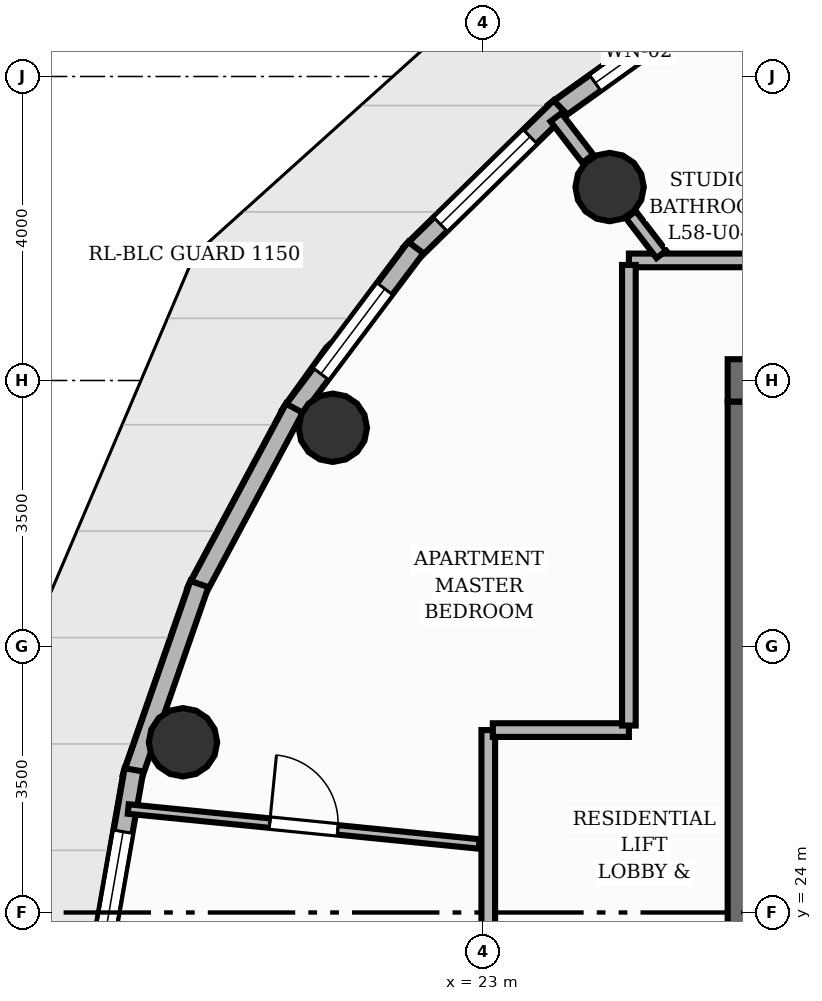
"""IFC4 building model, lengths in metres.
Left out: names, types, materials, properties, quantities, classifications, styles, units other than length and angle.
Written with IfcOpenShell. Run it as: python <this file> out.ifc"""

import sys

from ifc_helpers import new_model, si_unit, direction, frame, frame_2d, origin, origin_2d, place, context, subcontext, project, spatial, rectangle, circle, extrude, element, fill, save


model = new_model("IFC4")
c1 = context("Model", 3, precision=1e-05, world=origin(), true_north=direction((0.0, 1.0)))
c2 = subcontext(c1, "Body", "Model", "MODEL_VIEW")
j1 = project(units=[si_unit("LENGTHUNIT", "METRE"), si_unit("PLANEANGLEUNIT", "RADIAN")], contexts=[c1])
p1 = place(None, origin())
s1 = spatial("IfcSite", under=j1, at=p1, CompositionType="ELEMENT")
p2 = place(p1, origin())
s2 = spatial("IfcBuilding", under=s1, at=p2, CompositionType="ELEMENT")
p3 = place(p2, frame((0.0, 0.0, 195.04)))
s3 = spatial("IfcBuildingStorey", under=s2, at=p3, CompositionType="ELEMENT", Elevation=195.04)
p4 = place(p3, frame((26.22, 31.0, 0.0), z_axis=(0.0, 0.0, 1.0), x_axis=(1.0, 0.0, 0.0)))
e1 = element("IfcWall", 1, at=p4, inside=s3, PredefinedType="SHEAR", context=c2, shape_type="SweptSolid", body=[
    extrude(rectangle(XDim=11.56, YDim=0.56, at=frame_2d((5.78, 0.0))), origin(), (0.0, 0.0, 1.0), 3.2),
])
p5 = place(p4, frame((8.18, 0.0, 0.0)))
e2 = element("IfcOpeningElement", 2, at=p5, cuts=e1, PredefinedType="OPENING", context=c2, shape_type="SweptSolid", body=[
    extrude(rectangle(XDim=1.1, YDim=2.15, at=frame_2d((0.55, 1.075))), frame((0.0, 0.29, 0.0), z_axis=(0.0, -1.0, 0.0), x_axis=(1.0, 0.0, 0.0)), (0.0, 0.0, 1.0), 0.58),
])
p6 = place(p4, frame((0.805, 0.0, 0.0)))
e3 = element("IfcOpeningElement", 3, at=p6, cuts=e1, PredefinedType="OPENING", context=c2, shape_type="SweptSolid", body=[
    extrude(rectangle(XDim=1.05, YDim=2.15, at=frame_2d((0.525, 1.075))), frame((0.0, 0.29, 0.0), z_axis=(0.0, -1.0, 0.0), x_axis=(1.0, 0.0, 0.0)), (0.0, 0.0, 1.0), 0.58),
])
p7 = place(p4, frame((2.555, 0.0, 0.0)))
e4 = element("IfcOpeningElement", 4, at=p7, cuts=e1, PredefinedType="OPENING", context=c2, shape_type="SweptSolid", body=[
    extrude(rectangle(XDim=1.05, YDim=2.15, at=frame_2d((0.525, 1.075))), frame((0.0, 0.29, 0.0), z_axis=(0.0, -1.0, 0.0), x_axis=(1.0, 0.0, 0.0)), (0.0, 0.0, 1.0), 0.58),
])
p8 = place(p4, frame((4.305, 0.0, 0.0)))
e5 = element("IfcOpeningElement", 5, at=p8, cuts=e1, PredefinedType="OPENING", context=c2, shape_type="SweptSolid", body=[
    extrude(rectangle(XDim=1.05, YDim=2.15, at=frame_2d((0.525, 1.075))), frame((0.0, 0.29, 0.0), z_axis=(0.0, -1.0, 0.0), x_axis=(1.0, 0.0, 0.0)), (0.0, 0.0, 1.0), 0.58),
])
p9 = place(p3, frame((26.5, 17.28, 0.0), z_axis=(0.0, 0.0, 1.0), x_axis=(0.0, 1.0, 0.0)))
e6 = element("IfcWall", 6, at=p9, inside=s3, PredefinedType="SHEAR", context=c2, shape_type="SweptSolid", body=[
    extrude(rectangle(XDim=13.44, YDim=0.56, at=frame_2d((6.72, 0.0))), origin(), (0.0, 0.0, 1.0), 3.2),
])
for number, where, z_axis, x_axis in (
    (7, (24.667, 33.545, 0.0), (0.0, 0.0, 1.0), (1.0, 0.0, 0.0)),
    (8, (21.025, 30.378, 0.0), (0.0, 0.0, 1.0), (1.0, 0.0, 0.0)),
    (9, (19.054, 26.24, 0.0), (0.0, 0.0, 1.0), (1.0, 0.0, 0.0)),
):
    element("IfcColumn", number, at=place(p3, frame(where, z_axis=z_axis, x_axis=x_axis)), inside=s3, PredefinedType="COLUMN", context=c2, shape_type="SweptSolid", body=[
        extrude(circle(Radius=0.45, at=origin_2d()), origin(), (0.0, 0.0, 1.0), 3.2),
    ])
p10 = place(p3, frame((23.934, 34.526, 0.0), z_axis=(0.0, 0.0, 1.0), x_axis=(0.812997900305, 0.58226661771, 0.0)))
e10 = element("IfcWall", 10, at=p10, inside=s3, PredefinedType="SOLIDWALL", context=c2, shape_type="SweptSolid", body=[
    extrude(rectangle(XDim=2.739, YDim=0.25, at=frame_2d((1.369, 0.0))), origin(), (0.0, 0.0, 1.0), 2.96),
])
p11 = place(p10, frame((0.669, 0.0, 0.85)))
e11 = element("IfcOpeningElement", 11, at=p11, cuts=e10, PredefinedType="OPENING", context=c2, shape_type="SweptSolid", body=[
    extrude(rectangle(XDim=1.4, YDim=1.55, at=frame_2d((0.7, 0.775))), frame((0.0, 0.135, 0.0), z_axis=(0.0, -1.0, 0.0), x_axis=(1.0, 0.0, 0.0)), (0.0, 0.0, 1.0), 0.27),
])
p12 = place(p3, frame((22.045, 32.667, 0.0), z_axis=(0.0, 0.0, 1.0), x_axis=(0.71485422762, 0.699273503898, 0.0)))
e12 = element("IfcWall", 12, at=p12, inside=s3, PredefinedType="SOLIDWALL", context=c2, shape_type="SweptSolid", body=[
    extrude(rectangle(XDim=2.758, YDim=0.25, at=frame_2d((1.379, 0.0))), origin(), (0.0, 0.0, 1.0), 2.96),
])
p13 = place(p12, frame((0.554, 0.0, 0.85)))
e13 = element("IfcOpeningElement", 13, at=p13, cuts=e12, PredefinedType="OPENING", context=c2, shape_type="SweptSolid", body=[
    extrude(rectangle(XDim=1.65, YDim=1.55, at=frame_2d((0.825, 0.775))), frame((0.0, 0.135, 0.0), z_axis=(0.0, -1.0, 0.0), x_axis=(1.0, 0.0, 0.0)), (0.0, 0.0, 1.0), 0.27),
])
p14 = place(p3, frame((20.46, 30.544, 0.0), z_axis=(0.0, 0.0, 1.0), x_axis=(0.600877762795, 0.799340924874, 0.0)))
e14 = element("IfcWall", 14, at=p14, inside=s3, PredefinedType="SOLIDWALL", context=c2, shape_type="SweptSolid", body=[
    extrude(rectangle(XDim=2.758, YDim=0.25, at=frame_2d((1.379, 0.0))), origin(), (0.0, 0.0, 1.0), 2.96),
])
p15 = place(p14, frame((0.679, 0.0, 0.85)))
e15 = element("IfcOpeningElement", 15, at=p15, cuts=e14, PredefinedType="OPENING", context=c2, shape_type="SweptSolid", body=[
    extrude(rectangle(XDim=1.4, YDim=1.55, at=frame_2d((0.7, 0.775))), frame((0.0, 0.135, 0.0), z_axis=(0.0, -1.0, 0.0), x_axis=(1.0, 0.0, 0.0)), (0.0, 0.0, 1.0), 0.27),
])
p16 = place(p3, frame((19.226, 28.221, 0.0), z_axis=(0.0, 0.0, 1.0), x_axis=(0.472035862223, 0.88157934684, 0.0)))
e16 = element("IfcWall", 16, at=p16, inside=s3, PredefinedType="SOLIDWALL", context=c2, shape_type="SweptSolid", body=[
    extrude(rectangle(XDim=2.739, YDim=0.25, at=frame_2d((1.369, 0.0))), origin(), (0.0, 0.0, 1.0), 2.96),
])
p17 = place(p3, frame((18.381, 25.77, 0.0), z_axis=(0.0, 0.0, 1.0), x_axis=(0.329021781096, 0.94432233245, 0.0)))
e17 = element("IfcWall", 17, at=p17, inside=s3, PredefinedType="SOLIDWALL", context=c2, shape_type="SweptSolid", body=[
    extrude(rectangle(XDim=2.702, YDim=0.25, at=frame_2d((1.351, 0.0))), origin(), (0.0, 0.0, 1.0), 2.96),
])
p18 = place(p3, frame((17.95, 23.265, 0.0), z_axis=(0.0, 0.0, 1.0), x_axis=(0.172755592744, 0.984964722808, 0.0)))
e18 = element("IfcWall", 18, at=p18, inside=s3, PredefinedType="SOLIDWALL", context=c2, shape_type="SweptSolid", body=[
    extrude(rectangle(XDim=2.651, YDim=0.25, at=frame_2d((1.326, 0.0))), origin(), (0.0, 0.0, 1.0), 2.96),
])
p19 = place(p18, frame((0.175, 0.0, 0.85)))
e19 = element("IfcOpeningElement", 19, at=p19, cuts=e18, PredefinedType="OPENING", context=c2, shape_type="SweptSolid", body=[
    extrude(rectangle(XDim=1.65, YDim=1.55, at=frame_2d((0.825, 0.775))), frame((0.0, 0.135, 0.0), z_axis=(0.0, -1.0, 0.0), x_axis=(1.0, 0.0, 0.0)), (0.0, 0.0, 1.0), 0.27),
])
p20 = place(p3, frame((24.38, 33.918, 0.0), z_axis=(0.0, 0.0, 1.0), x_axis=(-0.60904199592, 0.793137974885, 0.0)))
e20 = element("IfcWall", 20, at=p20, inside=s3, PredefinedType="PARTITIONING", context=c2, shape_type="SweptSolid", body=[
    extrude(rectangle(XDim=0.688, YDim=0.18, at=frame_2d((0.344, 0.0))), origin(), (0.0, 0.0, 1.0), 2.403),
])
p21 = place(p3, frame((24.92, 32.58, 0.0), z_axis=(0.0, 0.0, 1.0), x_axis=(1.0, 0.0, 0.0)))
e21 = element("IfcWall", 21, at=p21, inside=s3, PredefinedType="PARTITIONING", context=c2, shape_type="SweptSolid", body=[
    extrude(rectangle(XDim=14.16, YDim=0.18, at=frame_2d((7.08, 0.0))), origin(), (0.0, 0.0, 1.0), 2.955),
])
p22 = place(p21, frame((11.563, 0.0, 0.0)))
e22 = element("IfcOpeningElement", 22, at=p22, cuts=e21, PredefinedType="OPENING", context=c2, shape_type="SweptSolid", body=[
    extrude(rectangle(XDim=1.05, YDim=2.15, at=frame_2d((0.525, 1.075))), frame((0.0, 0.1, 0.0), z_axis=(0.0, -1.0, 0.0), x_axis=(1.0, 0.0, 0.0)), (0.0, 0.0, 1.0), 0.2),
])
p23 = place(p21, frame((5.684, 0.0, 0.0)))
e23 = element("IfcOpeningElement", 23, at=p23, cuts=e21, PredefinedType="OPENING", context=c2, shape_type="SweptSolid", body=[
    extrude(rectangle(XDim=1.05, YDim=2.15, at=frame_2d((0.525, 1.075))), frame((0.0, 0.1, 0.0), z_axis=(0.0, -1.0, 0.0), x_axis=(1.0, 0.0, 0.0)), (0.0, 0.0, 1.0), 0.2),
])
p24 = place(p3, frame((23.07, 21.66, 0.0), z_axis=(0.0, 0.0, 1.0), x_axis=(0.0, 1.0, 0.0)))
e24 = element("IfcWall", 24, at=p24, inside=s3, PredefinedType="PARTITIONING", context=c2, shape_type="SweptSolid", body=[
    extrude(rectangle(XDim=4.74, YDim=0.18, at=frame_2d((2.37, 0.0))), origin(), (0.0, 0.0, 1.0), 2.955),
])
p25 = place(p24, frame((1.1, 0.0, 0.0)))
e25 = element("IfcOpeningElement", 25, at=p25, cuts=e24, PredefinedType="OPENING", context=c2, shape_type="SweptSolid", body=[
    extrude(rectangle(XDim=1.05, YDim=2.15, at=frame_2d((0.525, 1.075))), frame((0.0, 0.1, 0.0), z_axis=(0.0, -1.0, 0.0), x_axis=(1.0, 0.0, 0.0)), (0.0, 0.0, 1.0), 0.2),
])
p26 = place(p3, frame((23.13, 26.4, 0.0), z_axis=(0.0, 0.0, 1.0), x_axis=(1.0, 0.0, 0.0)))
e26 = element("IfcWall", 26, at=p26, inside=s3, PredefinedType="PARTITIONING", context=c2, shape_type="SweptSolid", body=[
    extrude(rectangle(XDim=1.79, YDim=0.18, at=frame_2d((0.895, 0.0))), origin(), (0.0, 0.0, 1.0), 2.692),
])
p27 = place(p3, frame((24.92, 26.46, 0.0), z_axis=(0.0, 0.0, 1.0), x_axis=(0.0, 1.0, 0.0)))
e27 = element("IfcWall", 27, at=p27, inside=s3, PredefinedType="PARTITIONING", context=c2, shape_type="SweptSolid", body=[
    extrude(rectangle(XDim=6.06, YDim=0.18, at=frame_2d((3.03, 0.0))), origin(), (0.0, 0.0, 1.0), 2.955),
])
p28 = place(p3, frame((25.347, 32.659, 0.0), z_axis=(0.0, 0.0, 1.0), x_axis=(-0.609101063055, 0.79309261438, 0.0)))
e28 = element("IfcWall", 28, at=p28, inside=s3, PredefinedType="PLUMBINGWALL", context=c2, shape_type="SweptSolid", body=[
    extrude(rectangle(XDim=0.658, YDim=0.16, at=frame_2d((0.329, 0.0))), origin(), (0.0, 0.0, 1.0), 2.403),
])
p29 = place(p3, frame((18.333, 25.362, 0.0), z_axis=(0.0, 0.0, 1.0), x_axis=(0.995074627982, -0.09912862728, 0.0)))
e29 = element("IfcWall", 29, at=p29, inside=s3, PredefinedType="PARTITIONING", context=c2, shape_type="SweptSolid", body=[
    extrude(rectangle(XDim=4.64, YDim=0.125, at=frame_2d((2.32, 0.0))), origin(), (0.0, 0.0, 1.0), 2.955),
])
p30 = place(p29, frame((1.87, 0.0, 0.0)))
e30 = element("IfcOpeningElement", 30, at=p30, cuts=e29, PredefinedType="OPENING", context=c2, shape_type="SweptSolid", body=[
    extrude(rectangle(XDim=0.9, YDim=2.1, at=frame_2d((0.45, 1.05))), frame((0.0, 0.073, 0.0), z_axis=(0.0, -1.0, 0.0), x_axis=(1.0, 0.0, 0.0)), (0.0, 0.0, 1.0), 0.145),
])
p31 = place(p11, origin())
e31 = element("IfcWindow", 31, at=p31, inside=s3, PartitioningType="SINGLE_PANEL", PredefinedType="WINDOW", context=c2, shape_type="SweptSolid", body=[
    extrude(rectangle(XDim=1.4, YDim=1.55, at=frame_2d((0.7, 0.775))), frame((0.0, 0.03, 0.0), z_axis=(0.0, -1.0, 0.0), x_axis=(1.0, 0.0, 0.0)), (0.0, 0.0, 1.0), 0.06),
])
fill(e11, e31)
p32 = place(p13, origin())
e32 = element("IfcWindow", 32, at=p32, inside=s3, PartitioningType="SINGLE_PANEL", PredefinedType="WINDOW", context=c2, shape_type="SweptSolid", body=[
    extrude(rectangle(XDim=1.65, YDim=1.55, at=frame_2d((0.825, 0.775))), frame((0.0, 0.03, 0.0), z_axis=(0.0, -1.0, 0.0), x_axis=(1.0, 0.0, 0.0)), (0.0, 0.0, 1.0), 0.06),
])
fill(e13, e32)
p33 = place(p15, origin())
e33 = element("IfcWindow", 33, at=p33, inside=s3, PartitioningType="SINGLE_PANEL", PredefinedType="WINDOW", context=c2, shape_type="SweptSolid", body=[
    extrude(rectangle(XDim=1.4, YDim=1.55, at=frame_2d((0.7, 0.775))), frame((0.0, 0.03, 0.0), z_axis=(0.0, -1.0, 0.0), x_axis=(1.0, 0.0, 0.0)), (0.0, 0.0, 1.0), 0.06),
])
fill(e15, e33)
p34 = place(p19, origin())
e34 = element("IfcWindow", 34, at=p34, inside=s3, PartitioningType="SINGLE_PANEL", PredefinedType="WINDOW", context=c2, shape_type="SweptSolid", body=[
    extrude(rectangle(XDim=1.65, YDim=1.55, at=frame_2d((0.825, 0.775))), frame((0.0, 0.03, 0.0), z_axis=(0.0, -1.0, 0.0), x_axis=(1.0, 0.0, 0.0)), (0.0, 0.0, 1.0), 0.06),
])
fill(e19, e34)
p35 = place(p30, origin())
e35 = element("IfcDoor", 35, at=p35, inside=s3, OperationType="SINGLE_SWING_LEFT", PredefinedType="DOOR", context=c2, shape_type="SweptSolid", body=[
    extrude(rectangle(XDim=0.9, YDim=2.1, at=frame_2d((0.45, 1.05))), frame((0.0, 0.025, 0.0), z_axis=(0.0, -1.0, 0.0), x_axis=(1.0, 0.0, 0.0)), (0.0, 0.0, 1.0), 0.05),
])
fill(e30, e35)
save(model, sys.argv[1])
